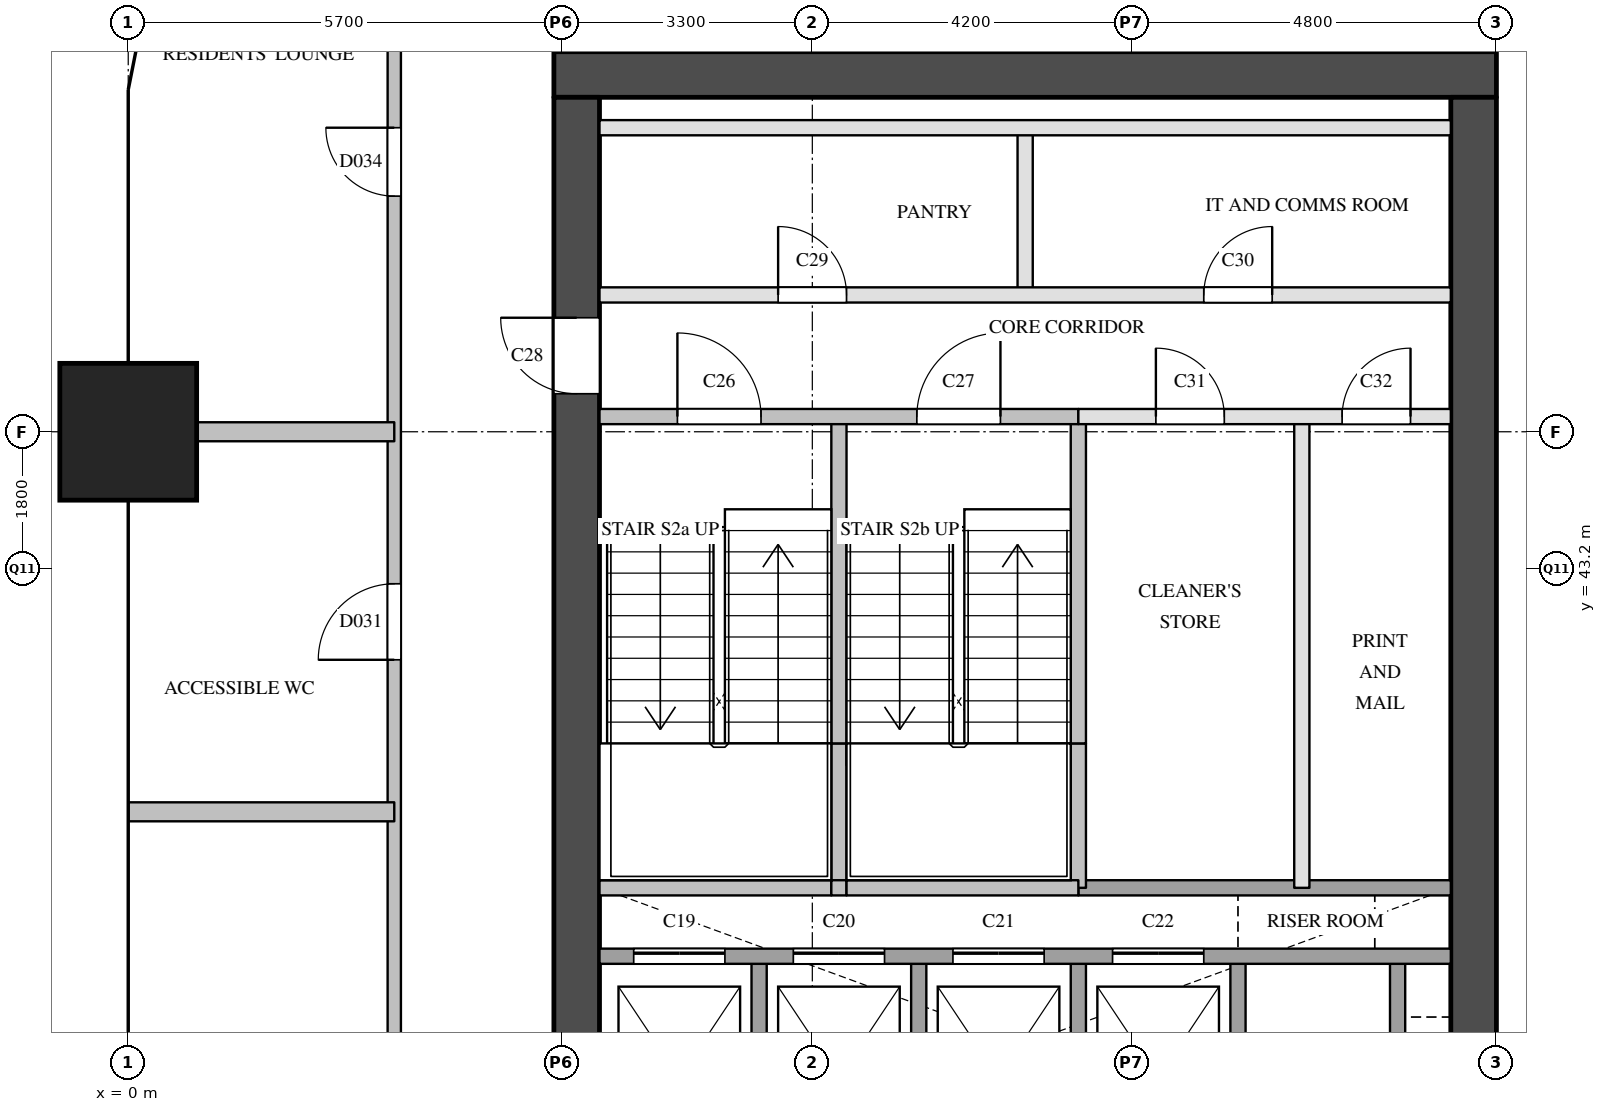
"""IFC4 building model, lengths in metres.
Left out: names, types, materials, properties, quantities, classifications, styles, units other than length and angle.
Written with IfcOpenShell. Run it as: python <this file> out.ifc"""

import sys

from ifc_helpers import new_model, si_unit, direction, frame, frame_2d, origin, origin_2d, place, context, subcontext, project, spatial, rectangle, extrude, element, fill, save


model = new_model("IFC4")
c1 = context("Model", 3, precision=1e-05, world=origin(), true_north=direction((0.0, 1.0)))
c2 = subcontext(c1, "Body", "Model", "MODEL_VIEW")
j1 = project(units=[si_unit("LENGTHUNIT", "METRE"), si_unit("PLANEANGLEUNIT", "RADIAN")], contexts=[c1])
p1 = place(None, origin())
s1 = spatial("IfcSite", under=j1, at=p1, CompositionType="ELEMENT")
p2 = place(p1, origin())
s2 = spatial("IfcBuilding", under=s1, at=p2, CompositionType="ELEMENT")
p3 = place(p2, frame((0.0, 0.0, 85.4)))
s3 = spatial("IfcBuildingStorey", under=s2, at=p3, CompositionType="ELEMENT", Elevation=85.4)
p4 = place(p3, frame((0.0, 45.0, 0.0), z_axis=(0.0, 0.0, 1.0), x_axis=(1.0, 0.0, 0.0)))
e1 = element("IfcColumn", 1, at=p4, inside=s3, PredefinedType="COLUMN", context=c2, shape_type="SweptSolid", body=[
    extrude(rectangle(XDim=1.8, YDim=1.8, at=origin_2d()), origin(), (0.0, 0.0, 1.0), 3.8),
])
p5 = place(p3, frame((5.6, 49.7, 0.0), z_axis=(0.0, 0.0, 1.0), x_axis=(1.0, 0.0, 0.0)))
e2 = element("IfcWall", 2, at=p5, inside=s3, PredefinedType="SHEAR", context=c2, shape_type="SweptSolid", body=[
    extrude(rectangle(XDim=12.4, YDim=0.6, at=frame_2d((6.2, 0.0))), origin(), (0.0, 0.0, 1.0), 3.5),
])
p6 = place(p3, frame((5.9, 29.1, 0.0), z_axis=(0.0, 0.0, 1.0), x_axis=(0.0, 1.0, 0.0)))
e3 = element("IfcWall", 3, at=p6, inside=s3, PredefinedType="SHEAR", context=c2, shape_type="SweptSolid", body=[
    extrude(rectangle(XDim=20.3, YDim=0.6, at=frame_2d((10.15, 0.0))), origin(), (0.0, 0.0, 1.0), 3.5),
])
p7 = place(p6, frame((3.6, 0.0, 0.0)))
e4 = element("IfcOpeningElement", 4, at=p7, cuts=e3, PredefinedType="OPENING", context=c2, shape_type="SweptSolid", body=[
    extrude(rectangle(XDim=1.8, YDim=2.1, at=frame_2d((0.9, 1.05))), frame((0.0, 0.31, 0.0), z_axis=(0.0, -1.0, 0.0), x_axis=(1.0, 0.0, 0.0)), (0.0, 0.0, 1.0), 0.62),
])
p8 = place(p6, frame((16.4, 0.0, 0.0)))
e5 = element("IfcOpeningElement", 5, at=p8, cuts=e3, PredefinedType="OPENING", context=c2, shape_type="SweptSolid", body=[
    extrude(rectangle(XDim=1.0, YDim=2.1, at=frame_2d((0.5, 1.05))), frame((0.0, 0.31, 0.0), z_axis=(0.0, -1.0, 0.0), x_axis=(1.0, 0.0, 0.0)), (0.0, 0.0, 1.0), 0.62),
])
p9 = place(p3, frame((17.7, 29.1, 0.0), z_axis=(0.0, 0.0, 1.0), x_axis=(0.0, 1.0, 0.0)))
e6 = element("IfcWall", 6, at=p9, inside=s3, PredefinedType="SHEAR", context=c2, shape_type="SweptSolid", body=[
    extrude(rectangle(XDim=20.3, YDim=0.6, at=frame_2d((10.15, 0.0))), origin(), (0.0, 0.0, 1.0), 3.5),
])
p10 = place(p9, frame((1.25, 0.0, 0.0)))
e7 = element("IfcOpeningElement", 7, at=p10, cuts=e6, PredefinedType="OPENING", context=c2, shape_type="SweptSolid", body=[
    extrude(rectangle(XDim=0.7, YDim=2.1, at=frame_2d((0.35, 1.05))), frame((0.0, 0.31, 0.0), z_axis=(0.0, -1.0, 0.0), x_axis=(1.0, 0.0, 0.0)), (0.0, 0.0, 1.0), 0.62),
])
p11 = place(p9, frame((7.05, 0.0, 0.0)))
e8 = element("IfcOpeningElement", 8, at=p11, cuts=e6, PredefinedType="OPENING", context=c2, shape_type="SweptSolid", body=[
    extrude(rectangle(XDim=0.7, YDim=2.1, at=frame_2d((0.35, 1.05))), frame((0.0, 0.31, 0.0), z_axis=(0.0, -1.0, 0.0), x_axis=(1.0, 0.0, 0.0)), (0.0, 0.0, 1.0), 0.62),
])
p12 = place(p3, frame((8.3, 34.9, 0.0), z_axis=(0.0, 0.0, 1.0), x_axis=(0.0, 1.0, 0.0)))
e9 = element("IfcWall", 9, at=p12, inside=s3, PredefinedType="SOLIDWALL", context=c2, shape_type="SweptSolid", body=[
    extrude(rectangle(XDim=3.2, YDim=0.2, at=frame_2d((1.6, 0.0))), origin(), (0.0, 0.0, 1.0), 3.5),
])
p13 = place(p3, frame((9.35, 39.0, 0.0), z_axis=(0.0, 0.0, 1.0), x_axis=(0.0, 1.0, 0.0)))
e10 = element("IfcWall", 10, at=p13, inside=s3, PredefinedType="SOLIDWALL", context=c2, shape_type="SweptSolid", body=[
    extrude(rectangle(XDim=1.9, YDim=0.2, at=frame_2d((0.95, 0.0))), origin(), (0.0, 0.0, 1.0), 3.5),
])
p14 = place(p3, frame((9.35, 40.9, 0.0), z_axis=(0.0, 0.0, 1.0), x_axis=(0.0, 1.0, 0.0)))
e11 = element("IfcWall", 11, at=p14, inside=s3, PredefinedType="SOLIDWALL", context=c2, shape_type="SweptSolid", body=[
    extrude(rectangle(XDim=4.3, YDim=0.2, at=frame_2d((2.15, 0.0))), origin(), (0.0, 0.0, 1.0), 3.5),
])
p15 = place(p3, frame((10.4, 34.9, 0.0), z_axis=(0.0, 0.0, 1.0), x_axis=(0.0, 1.0, 0.0)))
e12 = element("IfcWall", 12, at=p15, inside=s3, PredefinedType="SOLIDWALL", context=c2, shape_type="SweptSolid", body=[
    extrude(rectangle(XDim=3.2, YDim=0.2, at=frame_2d((1.6, 0.0))), origin(), (0.0, 0.0, 1.0), 3.5),
])
p16 = place(p3, frame((11.8, 46.8, 0.0), z_axis=(0.0, 0.0, 1.0), x_axis=(0.0, 1.0, 0.0)))
e13 = element("IfcWall", 13, at=p16, inside=s3, PredefinedType="PARTITIONING", context=c2, shape_type="SweptSolid", body=[
    extrude(rectangle(XDim=2.2, YDim=0.2, at=frame_2d((1.1, 0.0))), origin(), (0.0, 0.0, 1.0), 3.5),
])
p17 = place(p3, frame((12.5, 34.9, 0.0), z_axis=(0.0, 0.0, 1.0), x_axis=(0.0, 1.0, 0.0)))
e14 = element("IfcWall", 14, at=p17, inside=s3, PredefinedType="SOLIDWALL", context=c2, shape_type="SweptSolid", body=[
    extrude(rectangle(XDim=3.2, YDim=0.2, at=frame_2d((1.6, 0.0))), origin(), (0.0, 0.0, 1.0), 3.5),
])
p18 = place(p3, frame((12.5, 39.0, 0.0), z_axis=(0.0, 0.0, 1.0), x_axis=(0.0, 1.0, 0.0)))
e15 = element("IfcWall", 15, at=p18, inside=s3, PredefinedType="SOLIDWALL", context=c2, shape_type="SweptSolid", body=[
    extrude(rectangle(XDim=1.9, YDim=0.2, at=frame_2d((0.95, 0.0))), origin(), (0.0, 0.0, 1.0), 3.5),
])
p19 = place(p3, frame((12.5, 40.9, 0.0), z_axis=(0.0, 0.0, 1.0), x_axis=(0.0, 1.0, 0.0)))
e16 = element("IfcWall", 16, at=p19, inside=s3, PredefinedType="SOLIDWALL", context=c2, shape_type="SweptSolid", body=[
    extrude(rectangle(XDim=4.3, YDim=0.2, at=frame_2d((2.15, 0.0))), origin(), (0.0, 0.0, 1.0), 3.5),
])
p20 = place(p3, frame((14.6, 34.9, 0.0), z_axis=(0.0, 0.0, 1.0), x_axis=(0.0, 1.0, 0.0)))
e17 = element("IfcWall", 17, at=p20, inside=s3, PredefinedType="SOLIDWALL", context=c2, shape_type="SweptSolid", body=[
    extrude(rectangle(XDim=3.2, YDim=0.2, at=frame_2d((1.6, 0.0))), origin(), (0.0, 0.0, 1.0), 3.5),
])
p21 = place(p3, frame((15.44, 39.0, 0.0), z_axis=(0.0, 0.0, 1.0), x_axis=(0.0, 1.0, 0.0)))
e18 = element("IfcWall", 18, at=p21, inside=s3, PredefinedType="PARTITIONING", context=c2, shape_type="SweptSolid", body=[
    extrude(rectangle(XDim=6.2, YDim=0.2, at=frame_2d((3.1, 0.0))), origin(), (0.0, 0.0, 1.0), 3.5),
])
p22 = place(p3, frame((16.7, 34.9, 0.0), z_axis=(0.0, 0.0, 1.0), x_axis=(0.0, 1.0, 0.0)))
e19 = element("IfcWall", 19, at=p22, inside=s3, PredefinedType="SOLIDWALL", context=c2, shape_type="SweptSolid", body=[
    extrude(rectangle(XDim=3.2, YDim=0.2, at=frame_2d((1.6, 0.0))), origin(), (0.0, 0.0, 1.0), 3.5),
])
p23 = place(p3, frame((6.2, 38.1, 0.0), z_axis=(0.0, 0.0, 1.0), x_axis=(1.0, 0.0, 0.0)))
e20 = element("IfcWall", 20, at=p23, inside=s3, PredefinedType="SOLIDWALL", context=c2, shape_type="SweptSolid", body=[
    extrude(rectangle(XDim=11.2, YDim=0.2, at=frame_2d((5.6, 0.0))), origin(), (0.0, 0.0, 1.0), 3.5),
])
p24 = place(p23, frame((0.45, 0.0, 0.0)))
e21 = element("IfcOpeningElement", 21, at=p24, cuts=e20, PredefinedType="OPENING", context=c2, shape_type="SweptSolid", body=[
    extrude(rectangle(XDim=1.2, YDim=2.1, at=frame_2d((0.6, 1.05))), frame((0.0, 0.11, 0.0), z_axis=(0.0, -1.0, 0.0), x_axis=(1.0, 0.0, 0.0)), (0.0, 0.0, 1.0), 0.22),
])
p25 = place(p23, frame((2.55, 0.0, 0.0)))
e22 = element("IfcOpeningElement", 22, at=p25, cuts=e20, PredefinedType="OPENING", context=c2, shape_type="SweptSolid", body=[
    extrude(rectangle(XDim=1.2, YDim=2.1, at=frame_2d((0.6, 1.05))), frame((0.0, 0.11, 0.0), z_axis=(0.0, -1.0, 0.0), x_axis=(1.0, 0.0, 0.0)), (0.0, 0.0, 1.0), 0.22),
])
p26 = place(p23, frame((4.65, 0.0, 0.0)))
e23 = element("IfcOpeningElement", 23, at=p26, cuts=e20, PredefinedType="OPENING", context=c2, shape_type="SweptSolid", body=[
    extrude(rectangle(XDim=1.2, YDim=2.1, at=frame_2d((0.6, 1.05))), frame((0.0, 0.11, 0.0), z_axis=(0.0, -1.0, 0.0), x_axis=(1.0, 0.0, 0.0)), (0.0, 0.0, 1.0), 0.22),
])
p27 = place(p23, frame((6.75, 0.0, 0.0)))
e24 = element("IfcOpeningElement", 24, at=p27, cuts=e20, PredefinedType="OPENING", context=c2, shape_type="SweptSolid", body=[
    extrude(rectangle(XDim=1.2, YDim=2.1, at=frame_2d((0.6, 1.05))), frame((0.0, 0.11, 0.0), z_axis=(0.0, -1.0, 0.0), x_axis=(1.0, 0.0, 0.0)), (0.0, 0.0, 1.0), 0.22),
])
p28 = place(p3, frame((12.5, 39.0, 0.0), z_axis=(0.0, 0.0, 1.0), x_axis=(1.0, 0.0, 0.0)))
e25 = element("IfcWall", 25, at=p28, inside=s3, PredefinedType="SOLIDWALL", context=c2, shape_type="SweptSolid", body=[
    extrude(rectangle(XDim=4.9, YDim=0.2, at=frame_2d((2.45, 0.0))), origin(), (0.0, 0.0, 1.0), 3.5),
])
p29 = place(p3, frame((6.2, 39.0, 0.0), z_axis=(0.0, 0.0, 1.0), x_axis=(1.0, 0.0, 0.0)))
e26 = element("IfcWall", 26, at=p29, inside=s3, PredefinedType="SOLIDWALL", context=c2, shape_type="SweptSolid", body=[
    extrude(rectangle(XDim=3.05, YDim=0.2, at=frame_2d((1.525, 0.0))), origin(), (0.0, 0.0, 1.0), 3.5),
])
p30 = place(p3, frame((9.25, 39.0, 0.0), z_axis=(0.0, 0.0, 1.0), x_axis=(1.0, 0.0, 0.0)))
e27 = element("IfcWall", 27, at=p30, inside=s3, PredefinedType="SOLIDWALL", context=c2, shape_type="SweptSolid", body=[
    extrude(rectangle(XDim=0.2, YDim=0.2, at=frame_2d((0.1, 0.0))), origin(), (0.0, 0.0, 1.0), 3.5),
])
p31 = place(p3, frame((9.45, 39.0, 0.0), z_axis=(0.0, 0.0, 1.0), x_axis=(1.0, 0.0, 0.0)))
e28 = element("IfcWall", 28, at=p31, inside=s3, PredefinedType="SOLIDWALL", context=c2, shape_type="SweptSolid", body=[
    extrude(rectangle(XDim=3.05, YDim=0.2, at=frame_2d((1.525, 0.0))), origin(), (0.0, 0.0, 1.0), 3.5),
])
p32 = place(p3, frame((12.5, 45.2, 0.0), z_axis=(0.0, 0.0, 1.0), x_axis=(1.0, 0.0, 0.0)))
e29 = element("IfcWall", 29, at=p32, inside=s3, PredefinedType="PARTITIONING", context=c2, shape_type="SweptSolid", body=[
    extrude(rectangle(XDim=4.9, YDim=0.2, at=frame_2d((2.45, 0.0))), origin(), (0.0, 0.0, 1.0), 3.5),
])
p33 = place(p32, frame((1.02, 0.0, 0.0)))
e30 = element("IfcOpeningElement", 30, at=p33, cuts=e29, PredefinedType="OPENING", context=c2, shape_type="SweptSolid", body=[
    extrude(rectangle(XDim=0.9, YDim=2.1, at=frame_2d((0.45, 1.05))), frame((0.0, 0.11, 0.0), z_axis=(0.0, -1.0, 0.0), x_axis=(1.0, 0.0, 0.0)), (0.0, 0.0, 1.0), 0.22),
])
p34 = place(p32, frame((3.47, 0.0, 0.0)))
e31 = element("IfcOpeningElement", 31, at=p34, cuts=e29, PredefinedType="OPENING", context=c2, shape_type="SweptSolid", body=[
    extrude(rectangle(XDim=0.9, YDim=2.1, at=frame_2d((0.45, 1.05))), frame((0.0, 0.11, 0.0), z_axis=(0.0, -1.0, 0.0), x_axis=(1.0, 0.0, 0.0)), (0.0, 0.0, 1.0), 0.22),
])
p35 = place(p3, frame((6.2, 45.2, 0.0), z_axis=(0.0, 0.0, 1.0), x_axis=(1.0, 0.0, 0.0)))
e32 = element("IfcWall", 32, at=p35, inside=s3, PredefinedType="SOLIDWALL", context=c2, shape_type="SweptSolid", body=[
    extrude(rectangle(XDim=6.3, YDim=0.2, at=frame_2d((3.15, 0.0))), origin(), (0.0, 0.0, 1.0), 3.5),
])
p36 = place(p35, frame((1.025, 0.0, 0.0)))
e33 = element("IfcOpeningElement", 33, at=p36, cuts=e32, PredefinedType="OPENING", context=c2, shape_type="SweptSolid", body=[
    extrude(rectangle(XDim=1.1, YDim=2.1, at=frame_2d((0.55, 1.05))), frame((0.0, 0.11, 0.0), z_axis=(0.0, -1.0, 0.0), x_axis=(1.0, 0.0, 0.0)), (0.0, 0.0, 1.0), 0.22),
])
p37 = place(p35, frame((4.175, 0.0, 0.0)))
e34 = element("IfcOpeningElement", 34, at=p37, cuts=e32, PredefinedType="OPENING", context=c2, shape_type="SweptSolid", body=[
    extrude(rectangle(XDim=1.1, YDim=2.1, at=frame_2d((0.55, 1.05))), frame((0.0, 0.11, 0.0), z_axis=(0.0, -1.0, 0.0), x_axis=(1.0, 0.0, 0.0)), (0.0, 0.0, 1.0), 0.22),
])
p38 = place(p3, frame((6.2, 46.8, 0.0), z_axis=(0.0, 0.0, 1.0), x_axis=(1.0, 0.0, 0.0)))
e35 = element("IfcWall", 35, at=p38, inside=s3, PredefinedType="PARTITIONING", context=c2, shape_type="SweptSolid", body=[
    extrude(rectangle(XDim=11.2, YDim=0.2, at=frame_2d((5.6, 0.0))), origin(), (0.0, 0.0, 1.0), 3.5),
])
p39 = place(p38, frame((2.35, 0.0, 0.0)))
e36 = element("IfcOpeningElement", 36, at=p39, cuts=e35, PredefinedType="OPENING", context=c2, shape_type="SweptSolid", body=[
    extrude(rectangle(XDim=0.9, YDim=2.1, at=frame_2d((0.45, 1.05))), frame((0.0, 0.11, 0.0), z_axis=(0.0, -1.0, 0.0), x_axis=(1.0, 0.0, 0.0)), (0.0, 0.0, 1.0), 0.22),
])
p40 = place(p38, frame((7.95, 0.0, 0.0)))
e37 = element("IfcOpeningElement", 37, at=p40, cuts=e35, PredefinedType="OPENING", context=c2, shape_type="SweptSolid", body=[
    extrude(rectangle(XDim=0.9, YDim=2.1, at=frame_2d((0.45, 1.05))), frame((0.0, 0.11, 0.0), z_axis=(0.0, -1.0, 0.0), x_axis=(1.0, 0.0, 0.0)), (0.0, 0.0, 1.0), 0.22),
])
p41 = place(p3, frame((6.2, 49.0, 0.0), z_axis=(0.0, 0.0, 1.0), x_axis=(1.0, 0.0, 0.0)))
e38 = element("IfcWall", 38, at=p41, inside=s3, PredefinedType="PARTITIONING", context=c2, shape_type="SweptSolid", body=[
    extrude(rectangle(XDim=11.2, YDim=0.2, at=frame_2d((5.6, 0.0))), origin(), (0.0, 0.0, 1.0), 3.5),
])
p42 = place(p3, frame((3.5, 28.5, 0.0), z_axis=(0.0, 0.0, 1.0), x_axis=(0.0, 1.0, 0.0)))
e39 = element("IfcWall", 39, at=p42, inside=s3, PredefinedType="PARTITIONING", context=c2, shape_type="SweptSolid", body=[
    extrude(rectangle(XDim=23.6, YDim=0.175, at=frame_2d((11.8, 0.0))), origin(), (0.0, 0.0, 1.0), 3.5),
])
p43 = place(p42, frame((5.3, 0.0, 0.0)))
e40 = element("IfcOpeningElement", 40, at=p43, cuts=e39, PredefinedType="OPENING", context=c2, shape_type="SweptSolid", body=[
    extrude(rectangle(XDim=0.9, YDim=2.1, at=frame_2d((0.45, 1.05))), frame((0.0, 0.097, 0.0), z_axis=(0.0, -1.0, 0.0), x_axis=(1.0, 0.0, 0.0)), (0.0, 0.0, 1.0), 0.195),
])
p44 = place(p42, frame((13.5, 0.0, 0.0)))
e41 = element("IfcOpeningElement", 41, at=p44, cuts=e39, PredefinedType="OPENING", context=c2, shape_type="SweptSolid", body=[
    extrude(rectangle(XDim=1.0, YDim=2.1, at=frame_2d((0.5, 1.05))), frame((0.0, 0.097, 0.0), z_axis=(0.0, -1.0, 0.0), x_axis=(1.0, 0.0, 0.0)), (0.0, 0.0, 1.0), 0.195),
])
p45 = place(p42, frame((19.6, 0.0, 0.0)))
e42 = element("IfcOpeningElement", 42, at=p45, cuts=e39, PredefinedType="OPENING", context=c2, shape_type="SweptSolid", body=[
    extrude(rectangle(XDim=0.9, YDim=2.1, at=frame_2d((0.45, 1.05))), frame((0.0, 0.097, 0.0), z_axis=(0.0, -1.0, 0.0), x_axis=(1.0, 0.0, 0.0)), (0.0, 0.0, 1.0), 0.195),
])
p46 = place(p3, frame((0.0, 40.0, 0.0), z_axis=(0.0, 0.0, 1.0), x_axis=(1.0, 0.0, 0.0)))
e43 = element("IfcWall", 43, at=p46, inside=s3, PredefinedType="PARTITIONING", context=c2, shape_type="SweptSolid", body=[
    extrude(rectangle(XDim=3.5, YDim=0.25, at=frame_2d((1.75, 0.0))), origin(), (0.0, 0.0, 1.0), 2.5),
])
p47 = place(p3, frame((0.0, 45.0, 0.0), z_axis=(0.0, 0.0, 1.0), x_axis=(1.0, 0.0, 0.0)))
e44 = element("IfcWall", 44, at=p47, inside=s3, PredefinedType="PARTITIONING", context=c2, shape_type="SweptSolid", body=[
    extrude(rectangle(XDim=3.5, YDim=0.25, at=frame_2d((1.75, 0.0))), origin(), (0.0, 0.0, 1.0), 3.5),
])
p48 = place(p24, origin())
e45 = element("IfcDoor", 45, at=p48, inside=s3, OperationType="SLIDING_TO_LEFT", PredefinedType="DOOR", context=c2, shape_type="SweptSolid", body=[
    extrude(rectangle(XDim=1.2, YDim=2.1, at=frame_2d((0.6, 1.05))), frame((0.0, 0.025, 0.0), z_axis=(0.0, -1.0, 0.0), x_axis=(1.0, 0.0, 0.0)), (0.0, 0.0, 1.0), 0.05),
])
fill(e21, e45)
p49 = place(p25, origin())
e46 = element("IfcDoor", 46, at=p49, inside=s3, OperationType="SLIDING_TO_LEFT", PredefinedType="DOOR", context=c2, shape_type="SweptSolid", body=[
    extrude(rectangle(XDim=1.2, YDim=2.1, at=frame_2d((0.6, 1.05))), frame((0.0, 0.025, 0.0), z_axis=(0.0, -1.0, 0.0), x_axis=(1.0, 0.0, 0.0)), (0.0, 0.0, 1.0), 0.05),
])
fill(e22, e46)
p50 = place(p26, origin())
e47 = element("IfcDoor", 47, at=p50, inside=s3, OperationType="SLIDING_TO_LEFT", PredefinedType="DOOR", context=c2, shape_type="SweptSolid", body=[
    extrude(rectangle(XDim=1.2, YDim=2.1, at=frame_2d((0.6, 1.05))), frame((0.0, 0.025, 0.0), z_axis=(0.0, -1.0, 0.0), x_axis=(1.0, 0.0, 0.0)), (0.0, 0.0, 1.0), 0.05),
])
fill(e23, e47)
p51 = place(p27, origin())
e48 = element("IfcDoor", 48, at=p51, inside=s3, OperationType="SLIDING_TO_LEFT", PredefinedType="DOOR", context=c2, shape_type="SweptSolid", body=[
    extrude(rectangle(XDim=1.2, YDim=2.1, at=frame_2d((0.6, 1.05))), frame((0.0, 0.025, 0.0), z_axis=(0.0, -1.0, 0.0), x_axis=(1.0, 0.0, 0.0)), (0.0, 0.0, 1.0), 0.05),
])
fill(e24, e48)
p52 = place(p36, origin())
e49 = element("IfcDoor", 49, at=p52, inside=s3, OperationType="SINGLE_SWING_LEFT", PredefinedType="DOOR", context=c2, shape_type="SweptSolid", body=[
    extrude(rectangle(XDim=1.1, YDim=2.1, at=frame_2d((0.55, 1.05))), frame((0.0, 0.025, 0.0), z_axis=(0.0, -1.0, 0.0), x_axis=(1.0, 0.0, 0.0)), (0.0, 0.0, 1.0), 0.05),
])
fill(e33, e49)
p53 = place(p37, origin())
e50 = element("IfcDoor", 50, at=p53, inside=s3, OperationType="SINGLE_SWING_RIGHT", PredefinedType="DOOR", context=c2, shape_type="SweptSolid", body=[
    extrude(rectangle(XDim=1.1, YDim=2.1, at=frame_2d((0.55, 1.05))), frame((0.0, 0.025, 0.0), z_axis=(0.0, -1.0, 0.0), x_axis=(1.0, 0.0, 0.0)), (0.0, 0.0, 1.0), 0.05),
])
fill(e34, e50)
p54 = place(p8, origin())
e51 = element("IfcDoor", 51, at=p54, inside=s3, OperationType="SINGLE_SWING_RIGHT", PredefinedType="DOOR", context=c2, shape_type="SweptSolid", body=[
    extrude(rectangle(XDim=1.0, YDim=2.1, at=frame_2d((0.5, 1.05))), frame((0.0, 0.025, 0.0), z_axis=(0.0, -1.0, 0.0), x_axis=(1.0, 0.0, 0.0)), (0.0, 0.0, 1.0), 0.05),
])
fill(e5, e51)
p55 = place(p39, origin())
e52 = element("IfcDoor", 52, at=p55, inside=s3, OperationType="SINGLE_SWING_LEFT", PredefinedType="DOOR", context=c2, shape_type="SweptSolid", body=[
    extrude(rectangle(XDim=0.9, YDim=2.1, at=frame_2d((0.45, 1.05))), frame((0.0, 0.025, 0.0), z_axis=(0.0, -1.0, 0.0), x_axis=(1.0, 0.0, 0.0)), (0.0, 0.0, 1.0), 0.05),
])
fill(e36, e52)
p56 = place(p40, origin())
e53 = element("IfcDoor", 53, at=p56, inside=s3, OperationType="SINGLE_SWING_RIGHT", PredefinedType="DOOR", context=c2, shape_type="SweptSolid", body=[
    extrude(rectangle(XDim=0.9, YDim=2.1, at=frame_2d((0.45, 1.05))), frame((0.0, 0.025, 0.0), z_axis=(0.0, -1.0, 0.0), x_axis=(1.0, 0.0, 0.0)), (0.0, 0.0, 1.0), 0.05),
])
fill(e37, e53)
p57 = place(p33, origin())
e54 = element("IfcDoor", 54, at=p57, inside=s3, OperationType="SINGLE_SWING_LEFT", PredefinedType="DOOR", context=c2, shape_type="SweptSolid", body=[
    extrude(rectangle(XDim=0.9, YDim=2.1, at=frame_2d((0.45, 1.05))), frame((0.0, 0.025, 0.0), z_axis=(0.0, -1.0, 0.0), x_axis=(1.0, 0.0, 0.0)), (0.0, 0.0, 1.0), 0.05),
])
fill(e30, e54)
p58 = place(p34, origin())
e55 = element("IfcDoor", 55, at=p58, inside=s3, OperationType="SINGLE_SWING_RIGHT", PredefinedType="DOOR", context=c2, shape_type="SweptSolid", body=[
    extrude(rectangle(XDim=0.9, YDim=2.1, at=frame_2d((0.45, 1.05))), frame((0.0, 0.025, 0.0), z_axis=(0.0, -1.0, 0.0), x_axis=(1.0, 0.0, 0.0)), (0.0, 0.0, 1.0), 0.05),
])
fill(e31, e55)
p59 = place(p44, origin())
e56 = element("IfcDoor", 56, at=p59, inside=s3, OperationType="SINGLE_SWING_LEFT", PredefinedType="DOOR", context=c2, shape_type="SweptSolid", body=[
    extrude(rectangle(XDim=1.0, YDim=2.1, at=frame_2d((0.5, 1.05))), frame((0.0, 0.025, 0.0), z_axis=(0.0, -1.0, 0.0), x_axis=(1.0, 0.0, 0.0)), (0.0, 0.0, 1.0), 0.05),
])
fill(e41, e56)
p60 = place(p45, origin())
e57 = element("IfcDoor", 57, at=p60, inside=s3, OperationType="SINGLE_SWING_RIGHT", PredefinedType="DOOR", context=c2, shape_type="SweptSolid", body=[
    extrude(rectangle(XDim=0.9, YDim=2.1, at=frame_2d((0.45, 1.05))), frame((0.0, 0.025, 0.0), z_axis=(0.0, -1.0, 0.0), x_axis=(1.0, 0.0, 0.0)), (0.0, 0.0, 1.0), 0.05),
])
fill(e42, e57)
save(model, sys.argv[1])
